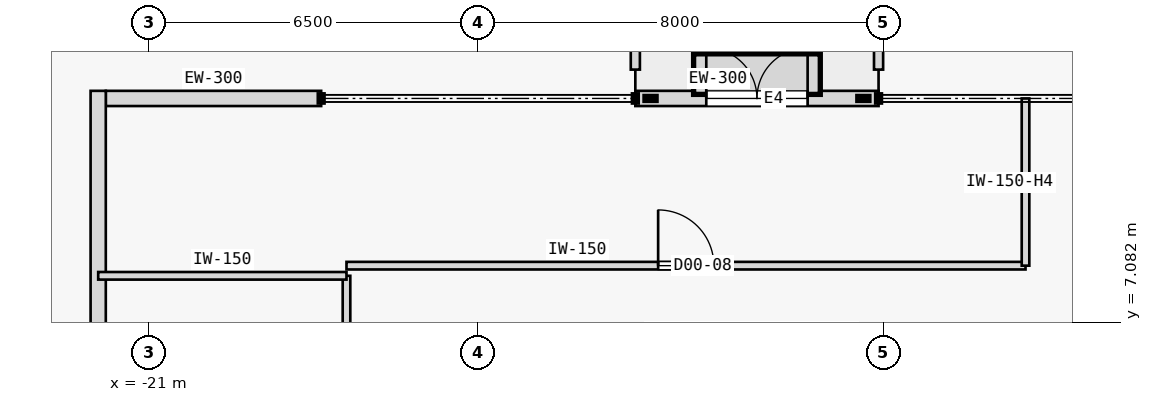
"""IFC4 building model, lengths in metres.
Left out: names, types, materials, properties, quantities, classifications, styles, units other than length and angle.
Written with IfcOpenShell. Run it as: python <this file> out.ifc"""

import sys

from ifc_helpers import new_model, si_unit, direction, frame, frame_2d, origin, place, context, subcontext, project, spatial, rectangle, extrude, element, fill, save


model = new_model("IFC4")
c1 = context("Model", 3, precision=1e-05, world=origin(), true_north=direction((0.0, 1.0)))
c2 = subcontext(c1, "Body", "Model", "MODEL_VIEW")
j1 = project(units=[si_unit("LENGTHUNIT", "METRE"), si_unit("PLANEANGLEUNIT", "RADIAN")], contexts=[c1])
p1 = place(None, origin())
s1 = spatial("IfcSite", under=j1, at=p1, CompositionType="ELEMENT")
p2 = place(p1, origin())
s2 = spatial("IfcBuilding", under=s1, at=p2, CompositionType="ELEMENT")
p3 = place(p2, origin())
s3 = spatial("IfcBuildingStorey", under=s2, at=p3, CompositionType="ELEMENT", Elevation=0.0)
p4 = place(p3, frame((-21.85, 11.5, 0.0), z_axis=(0.0, 0.0, 1.0), x_axis=(1.0, 0.0, 0.0)))
e1 = element("IfcWall", 1, at=p4, inside=s3, PredefinedType="STANDARD", context=c2, shape_type="SweptSolid", body=[
    extrude(rectangle(XDim=4.25, YDim=0.3, at=frame_2d((2.125, 0.0))), origin(), (0.0, 0.0, 1.0), 9.195),
])
p5 = place(p3, frame((-11.4, 11.5, 0.0), z_axis=(0.0, 0.0, 1.0), x_axis=(1.0, 0.0, 0.0)))
e2 = element("IfcWall", 2, at=p5, inside=s3, PredefinedType="STANDARD", context=c2, shape_type="SweptSolid", body=[
    extrude(rectangle(XDim=4.8, YDim=0.3, at=frame_2d((2.4, 0.0))), origin(), (0.0, 0.0, 1.0), 9.195),
])
p6 = place(p5, frame((1.4, 0.0, 0.0)))
e3 = element("IfcOpeningElement", 3, at=p6, cuts=e2, PredefinedType="OPENING", context=c2, shape_type="SweptSolid", body=[
    extrude(rectangle(XDim=2.0, YDim=2.4, at=frame_2d((1.0, 1.2))), frame((0.0, 0.16, 0.0), z_axis=(0.0, -1.0, 0.0), x_axis=(1.0, 0.0, 0.0)), (0.0, 0.0, 1.0), 0.32),
])
p7 = place(p3, frame((-22.0, -11.65, 0.0), z_axis=(0.0, 0.0, 1.0), x_axis=(0.0, 1.0, 0.0)))
e4 = element("IfcWall", 4, at=p7, inside=s3, PredefinedType="STANDARD", context=c2, shape_type="SweptSolid", body=[
    extrude(rectangle(XDim=23.3, YDim=0.3, at=frame_2d((11.65, 0.0))), origin(), (0.0, 0.0, 1.0), 9.195),
])
p8 = place(p7, frame((10.65, 0.0, 0.0)))
e5 = element("IfcOpeningElement", 5, at=p8, cuts=e4, PredefinedType="OPENING", context=c2, shape_type="SweptSolid", body=[
    extrude(rectangle(XDim=2.0, YDim=2.4, at=frame_2d((1.0, 1.2))), frame((0.0, 0.16, 0.0), z_axis=(0.0, -1.0, 0.0), x_axis=(1.0, 0.0, 0.0)), (0.0, 0.0, 1.0), 0.32),
])
p9 = place(p7, frame((1.4, 0.0, 1.1)))
e6 = element("IfcOpeningElement", 6, at=p9, cuts=e4, PredefinedType="OPENING", context=c2, shape_type="SweptSolid", body=[
    extrude(rectangle(XDim=2.4, YDim=2.1, at=frame_2d((1.2, 1.05))), frame((0.0, 0.16, 0.0), z_axis=(0.0, -1.0, 0.0), x_axis=(1.0, 0.0, 0.0)), (0.0, 0.0, 1.0), 0.32),
])
p10 = place(p7, frame((15.45, 0.0, 1.1)))
e7 = element("IfcOpeningElement", 7, at=p10, cuts=e4, PredefinedType="OPENING", context=c2, shape_type="SweptSolid", body=[
    extrude(rectangle(XDim=2.4, YDim=2.1, at=frame_2d((1.2, 1.05))), frame((0.0, 0.16, 0.0), z_axis=(0.0, -1.0, 0.0), x_axis=(1.0, 0.0, 0.0)), (0.0, 0.0, 1.0), 0.32),
])
for number, where, z_axis, x_axis in (
    (8, (-6.6, 12.069, 4.38), (0.0, 0.0, 1.0), (0.0, 1.0, 0.0)),
    (9, (-11.4, 15.001, 4.38), (0.0, 0.0, 1.0), (0.0, -1.0, 0.0)),
):
    element("IfcWall", number, at=place(p3, frame(where, z_axis=z_axis, x_axis=x_axis)), inside=s3, PredefinedType="PARAPET", context=c2, shape_type="SweptSolid", body=[
        extrude(rectangle(XDim=2.932, YDim=0.18, at=frame_2d((1.466, 0.0))), origin(), (0.0, 0.0, 1.0), 0.65),
    ])
p11 = place(p3, frame((-17.1, 8.2, 0.0), z_axis=(0.0, 0.0, 1.0), x_axis=(1.0, 0.0, 0.0)))
e10 = element("IfcWall", 10, at=p11, inside=s3, PredefinedType="PARTITIONING", context=c2, shape_type="SweptSolid", body=[
    extrude(rectangle(XDim=13.4, YDim=0.15, at=frame_2d((6.7, 0.0))), origin(), (0.0, 0.0, 1.0), 9.2),
])
p12 = place(p11, frame((6.15, 0.0, 0.0)))
e11 = element("IfcOpeningElement", 11, at=p12, cuts=e10, PredefinedType="OPENING", context=c2, shape_type="SweptSolid", body=[
    extrude(rectangle(XDim=1.1, YDim=2.15, at=frame_2d((0.55, 1.075))), frame((0.0, 0.085, 0.0), z_axis=(0.0, -1.0, 0.0), x_axis=(1.0, 0.0, 0.0)), (0.0, 0.0, 1.0), 0.17),
])
p13 = place(p3, frame((-3.7, 8.2, 0.0), z_axis=(0.0, 0.0, 1.0), x_axis=(0.0, 1.0, 0.0)))
e12 = element("IfcWall", 12, at=p13, inside=s3, PredefinedType="PARTITIONING", context=c2, shape_type="SweptSolid", body=[
    extrude(rectangle(XDim=3.3, YDim=0.15, at=frame_2d((1.65, 0.0))), origin(), (0.0, 0.0, 1.0), 8.14),
])
p14 = place(p3, frame((-17.1, -8.2, 0.0), z_axis=(0.0, 0.0, 1.0), x_axis=(0.0, 1.0, 0.0)))
e13 = element("IfcWall", 13, at=p14, inside=s3, PredefinedType="PARTITIONING", context=c2, shape_type="SweptSolid", body=[
    extrude(rectangle(XDim=16.2, YDim=0.15, at=frame_2d((8.1, 0.0))), origin(), (0.0, 0.0, 1.0), 9.2),
])
p15 = place(p14, frame((4.92, 0.0, 0.0)))
e14 = element("IfcOpeningElement", 14, at=p15, cuts=e13, PredefinedType="OPENING", context=c2, shape_type="SweptSolid", body=[
    extrude(rectangle(XDim=1.5, YDim=2.15, at=frame_2d((0.75, 1.075))), frame((0.0, 0.085, 0.0), z_axis=(0.0, -1.0, 0.0), x_axis=(1.0, 0.0, 0.0)), (0.0, 0.0, 1.0), 0.17),
])
p16 = place(p3, frame((-22.0, 8.0, 0.0), z_axis=(0.0, 0.0, 1.0), x_axis=(1.0, 0.0, 0.0)))
e15 = element("IfcWall", 15, at=p16, inside=s3, PredefinedType="PARTITIONING", context=c2, shape_type="SweptSolid", body=[
    extrude(rectangle(XDim=4.9, YDim=0.15, at=frame_2d((2.45, 0.0))), origin(), (0.0, 0.0, 1.0), 9.2),
])
p17 = place(p6, origin())
e16 = element("IfcDoor", 16, at=p17, inside=s3, OperationType="DOUBLE_DOOR_SINGLE_SWING", PredefinedType="DOOR", context=c2, shape_type="SweptSolid", body=[
    extrude(rectangle(XDim=2.0, YDim=2.4, at=frame_2d((1.0, 1.2))), frame((0.0, 0.025, 0.0), z_axis=(0.0, -1.0, 0.0), x_axis=(1.0, 0.0, 0.0)), (0.0, 0.0, 1.0), 0.05),
])
fill(e3, e16)
p18 = place(p12, origin())
e17 = element("IfcDoor", 17, at=p18, inside=s3, OperationType="SINGLE_SWING_LEFT", PredefinedType="DOOR", context=c2, shape_type="SweptSolid", body=[
    extrude(rectangle(XDim=1.1, YDim=2.15, at=frame_2d((0.55, 1.075))), frame((0.0, 0.025, 0.0), z_axis=(0.0, -1.0, 0.0), x_axis=(1.0, 0.0, 0.0)), (0.0, 0.0, 1.0), 0.05),
])
fill(e11, e17)
save(model, sys.argv[1])
